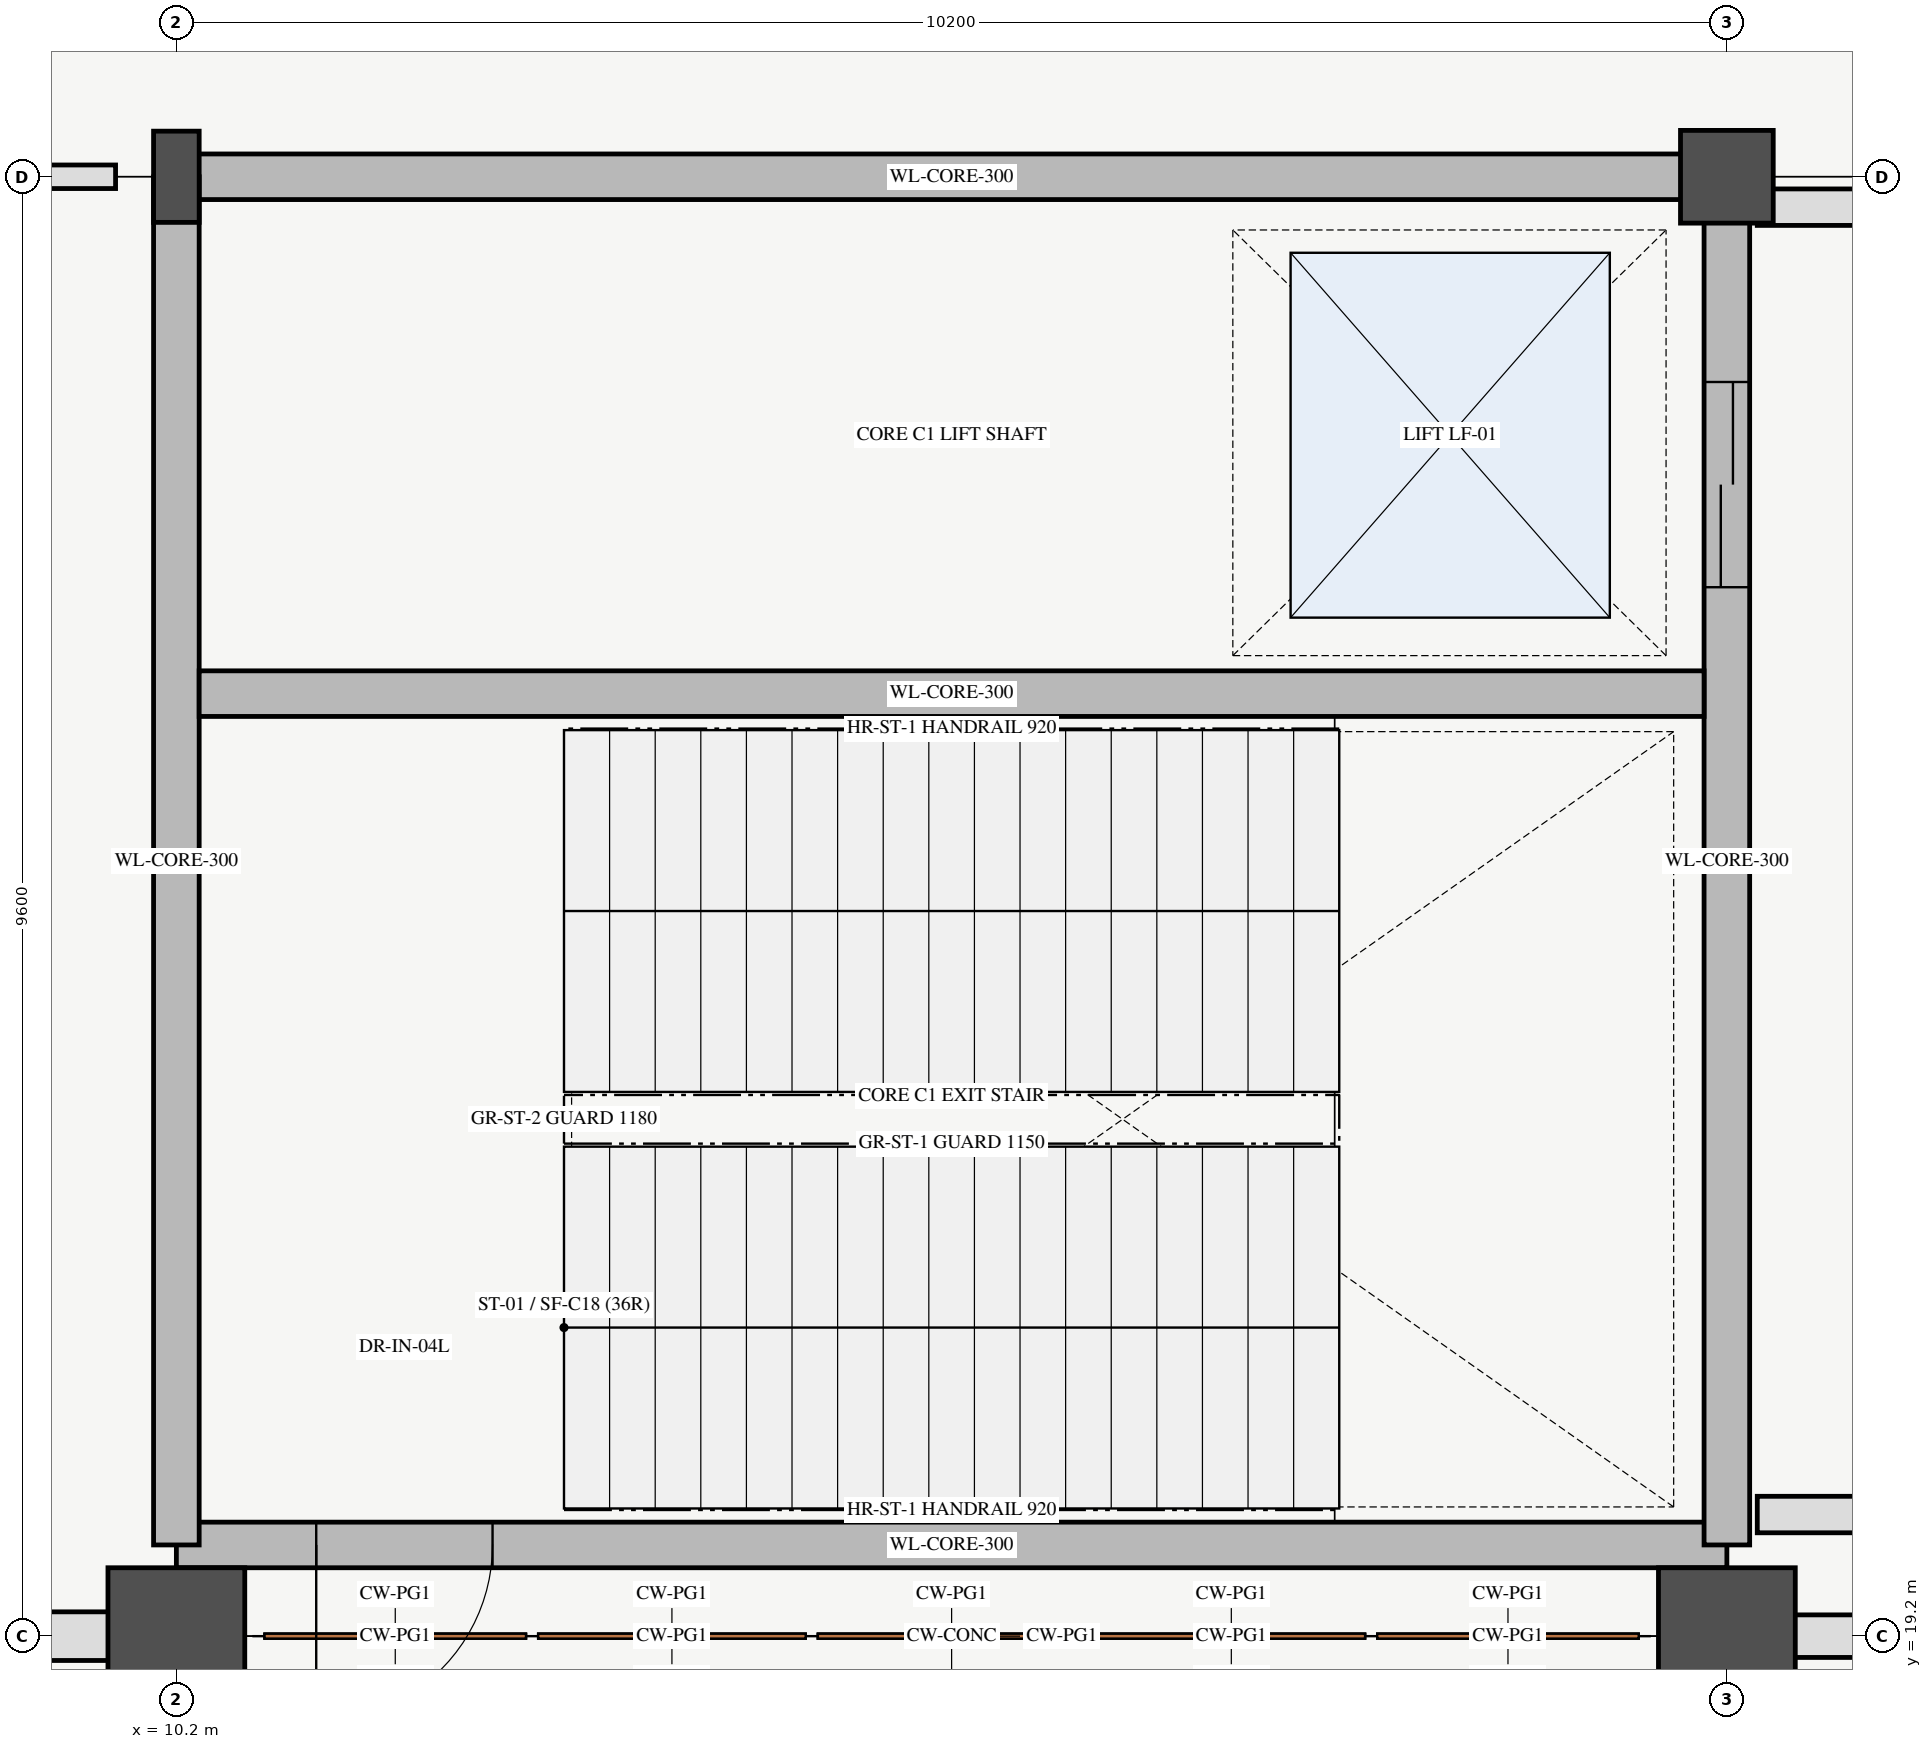
"""IFC4 building model, lengths in metres.
Left out: names, types, materials, properties, quantities, classifications, styles, units other than length and angle.
Written with IfcOpenShell. Run it as: python <this file> out.ifc"""

import sys

from ifc_helpers import new_model, si_unit, direction, frame, frame_2d, origin, origin_2d, place, context, subcontext, project, spatial, rectangle, hollow_circle, i_section, extrude, element, fill, save


model = new_model("IFC4")
c1 = context("Model", 3, precision=1e-05, world=origin(), true_north=direction((0.0, 1.0)))
c2 = subcontext(c1, "Body", "Model", "MODEL_VIEW")
j1 = project(units=[si_unit("LENGTHUNIT", "METRE"), si_unit("PLANEANGLEUNIT", "RADIAN")], contexts=[c1])
p1 = place(None, origin())
s1 = spatial("IfcSite", under=j1, at=p1, CompositionType="ELEMENT")
p2 = place(p1, origin())
s2 = spatial("IfcBuilding", under=s1, at=p2, CompositionType="ELEMENT")
p3 = place(p2, origin())
s3 = spatial("IfcBuildingStorey", under=s2, at=p3, CompositionType="ELEMENT", Elevation=0.0)
p4 = place(p3, frame((10.2, 19.2, 0.0), z_axis=(0.0, 0.0, 1.0), x_axis=(1.0, 0.0, 0.0)))
e1 = element("IfcColumn", 1, at=p4, inside=s3, PredefinedType="COLUMN", context=c2, shape_type="SweptSolid", body=[
    extrude(rectangle(XDim=0.9, YDim=0.9, at=origin_2d()), origin(), (0.0, 0.0, 1.0), 5.4),
])
p5 = place(p3, frame((10.2, 28.8, 0.0), z_axis=(0.0, 0.0, 1.0), x_axis=(1.0, 0.0, 0.0)))
e2 = element("IfcColumn", 2, at=p5, inside=s3, PredefinedType="COLUMN", context=c2, shape_type="SweptSolid", body=[
    extrude(i_section(OverallWidth=0.3, OverallDepth=0.6, WebThickness=0.015, FlangeThickness=0.03, FilletRadius=0.027, at=origin_2d()), origin(), (0.0, 0.0, 1.0), 5.4),
])
p6 = place(p3, frame((20.4, 19.2, 0.0), z_axis=(0.0, 0.0, 1.0), x_axis=(1.0, 0.0, 0.0)))
e3 = element("IfcColumn", 3, at=p6, inside=s3, PredefinedType="COLUMN", context=c2, shape_type="SweptSolid", body=[
    extrude(rectangle(XDim=0.9, YDim=0.9, at=origin_2d()), origin(), (0.0, 0.0, 1.0), 5.4),
])
p7 = place(p3, frame((20.4, 28.8, 0.0), z_axis=(0.0, 0.0, 1.0), x_axis=(1.0, 0.0, 0.0)))
e4 = element("IfcColumn", 4, at=p7, inside=s3, PredefinedType="COLUMN", context=c2, shape_type="SweptSolid", body=[
    extrude(hollow_circle(Radius=0.305, WallThickness=0.025, at=origin_2d()), origin(), (0.0, 0.0, 1.0), 5.4),
])
p8 = place(p3, frame((10.2, 19.8, 0.0), z_axis=(0.0, 0.0, 1.0), x_axis=(1.0, 0.0, 0.0)))
e5 = element("IfcWall", 5, at=p8, inside=s3, PredefinedType="SHEAR", context=c2, shape_type="SweptSolid", body=[
    extrude(rectangle(XDim=10.2, YDim=0.3, at=frame_2d((5.1, 0.0))), origin(), (0.0, 0.0, 1.0), 5.4),
])
p9 = place(p8, frame((0.92, 0.0, 0.0)))
e6 = element("IfcOpeningElement", 6, at=p9, cuts=e5, PredefinedType="OPENING", context=c2, shape_type="SweptSolid", body=[
    extrude(rectangle(XDim=1.16, YDim=2.2, at=frame_2d((0.58, 1.1))), frame((0.0, 0.16, 0.0), z_axis=(0.0, -1.0, 0.0), x_axis=(1.0, 0.0, 0.0)), (0.0, 0.0, 1.0), 0.32),
])
p10 = place(p3, frame((10.2, 28.8, 0.0), z_axis=(0.0, 0.0, 1.0), x_axis=(1.0, 0.0, 0.0)))
e7 = element("IfcWall", 7, at=p10, inside=s3, PredefinedType="SHEAR", context=c2, shape_type="SweptSolid", body=[
    extrude(rectangle(XDim=10.2, YDim=0.3, at=frame_2d((5.1, 0.0))), origin(), (0.0, 0.0, 1.0), 5.4),
])
p11 = place(p3, frame((10.2, 19.8, 0.0), z_axis=(0.0, 0.0, 1.0), x_axis=(0.0, 1.0, 0.0)))
e8 = element("IfcWall", 8, at=p11, inside=s3, PredefinedType="SHEAR", context=c2, shape_type="SweptSolid", body=[
    extrude(rectangle(XDim=9.0, YDim=0.3, at=frame_2d((4.5, 0.0))), origin(), (0.0, 0.0, 1.0), 5.4),
])
p12 = place(p3, frame((20.4, 19.8, 0.0), z_axis=(0.0, 0.0, 1.0), x_axis=(0.0, 1.0, 0.0)))
e9 = element("IfcWall", 9, at=p12, inside=s3, PredefinedType="SHEAR", context=c2, shape_type="SweptSolid", body=[
    extrude(rectangle(XDim=9.0, YDim=0.3, at=frame_2d((4.5, 0.0))), origin(), (0.0, 0.0, 1.0), 5.4),
])
p13 = place(p12, frame((6.3, 0.0, 0.0)))
e10 = element("IfcOpeningElement", 10, at=p13, cuts=e9, PredefinedType="OPENING", context=c2, shape_type="SweptSolid", body=[
    extrude(rectangle(XDim=1.35, YDim=2.3, at=frame_2d((0.675, 1.15))), frame((0.0, 0.16, 0.0), z_axis=(0.0, -1.0, 0.0), x_axis=(1.0, 0.0, 0.0)), (0.0, 0.0, 1.0), 0.32),
])
p14 = place(p3, frame((0.24, 19.2, 0.0), z_axis=(0.0, 0.0, 1.0), x_axis=(1.0, 0.0, 0.0)))
e11 = element("IfcWall", 11, at=p14, inside=s3, PredefinedType="SOLIDWALL", context=c2, shape_type="SweptSolid", body=[
    extrude(rectangle(XDim=9.72, YDim=0.32, at=frame_2d((4.86, 0.0))), origin(), (0.0, 0.0, 1.0), 3.68),
])
p15 = place(p14, frame((2.122, 0.0, 0.0)))
e12 = element("IfcOpeningElement", 12, at=p15, cuts=e11, PredefinedType="OPENING", context=c2, shape_type="SweptSolid", body=[
    extrude(rectangle(XDim=1.2, YDim=2.2, at=frame_2d((0.6, 1.1))), frame((0.0, 0.17, 0.0), z_axis=(0.0, -1.0, 0.0), x_axis=(1.0, 0.0, 0.0)), (0.0, 0.0, 1.0), 0.34),
])
p16 = place(p14, frame((4.81, 0.0, 0.9)))
e13 = element("IfcOpeningElement", 13, at=p16, cuts=e11, PredefinedType="OPENING", context=c2, shape_type="SweptSolid", body=[
    extrude(rectangle(XDim=3.6, YDim=2.1, at=frame_2d((1.8, 1.05))), frame((0.0, 0.17, 0.0), z_axis=(0.0, -1.0, 0.0), x_axis=(1.0, 0.0, 0.0)), (0.0, 0.0, 1.0), 0.34),
])
p17 = place(p3, frame((20.64, 19.2, 0.0), z_axis=(0.0, 0.0, 1.0), x_axis=(1.0, 0.0, 0.0)))
e14 = element("IfcWall", 14, at=p17, inside=s3, PredefinedType="STANDARD", context=c2, shape_type="SweptSolid", body=[
    extrude(rectangle(XDim=9.72, YDim=0.28, at=frame_2d((4.86, 0.0))), origin(), (0.0, 0.0, 1.0), 3.68),
])
p18 = place(p17, frame((1.027, 0.0, 0.0)))
e15 = element("IfcOpeningElement", 15, at=p18, cuts=e14, PredefinedType="OPENING", context=c2, shape_type="SweptSolid", body=[
    extrude(rectangle(XDim=3.0, YDim=2.5, at=frame_2d((1.5, 1.25))), frame((0.0, 0.15, 0.0), z_axis=(0.0, -1.0, 0.0), x_axis=(1.0, 0.0, 0.0)), (0.0, 0.0, 1.0), 0.3),
])
p19 = place(p17, frame((5.198, 0.0, 0.85)))
e16 = element("IfcOpeningElement", 16, at=p19, cuts=e14, PredefinedType="OPENING", context=c2, shape_type="SweptSolid", body=[
    extrude(rectangle(XDim=3.6, YDim=2.1, at=frame_2d((1.8, 1.05))), frame((0.0, 0.15, 0.0), z_axis=(0.0, -1.0, 0.0), x_axis=(1.0, 0.0, 0.0)), (0.0, 0.0, 1.0), 0.3),
])
p20 = place(p3, frame((10.35, 25.4, 0.0), z_axis=(0.0, 0.0, 1.0), x_axis=(1.0, 0.0, 0.0)))
e17 = element("IfcWall", 17, at=p20, inside=s3, PredefinedType="SHEAR", context=c2, shape_type="SweptSolid", body=[
    extrude(rectangle(XDim=9.9, YDim=0.3, at=frame_2d((4.95, 0.0))), origin(), (0.0, 0.0, 1.0), 5.4),
])
for number, where, z_axis, x_axis in (
    (18, (20.6, 28.6, 0.0), (0.0, 0.0, 1.0), (1.0, 0.0, 0.0)),
    (19, (20.6, 20.0, 0.0), (0.0, 0.0, 1.0), (1.0, 0.0, 0.0)),
):
    element("IfcWall", number, at=place(p3, frame(where, z_axis=z_axis, x_axis=x_axis)), inside=s3, PredefinedType="PARTITIONING", context=c2, shape_type="SweptSolid", body=[
        extrude(rectangle(XDim=5.0, YDim=0.24, at=frame_2d((2.5, 0.0))), origin(), (0.0, 0.0, 1.0), 4.08),
    ])
p21 = place(p3, frame((0.4, 28.8, 0.0), z_axis=(0.0, 0.0, 1.0), x_axis=(1.0, 0.0, 0.0)))
e20 = element("IfcWall", 20, at=p21, inside=s3, PredefinedType="PARTITIONING", context=c2, shape_type="SweptSolid", body=[
    extrude(rectangle(XDim=9.4, YDim=0.155, at=frame_2d((4.7, 0.0))), origin(), (0.0, 0.0, 1.0), 4.08),
])
p22 = place(p21, frame((4.2, 0.0, 0.0)))
e21 = element("IfcOpeningElement", 21, at=p22, cuts=e20, PredefinedType="OPENING", context=c2, shape_type="SweptSolid", body=[
    extrude(rectangle(XDim=1.0, YDim=2.15, at=frame_2d((0.5, 1.075))), frame((0.0, 0.087, 0.0), z_axis=(0.0, -1.0, 0.0), x_axis=(1.0, 0.0, 0.0)), (0.0, 0.0, 1.0), 0.175),
])
p23 = place(p9, frame((1.16, 0.0, 0.0), z_axis=(0.0, 0.0, 1.0), x_axis=(-1.0, 0.0, 0.0)))
e22 = element("IfcDoor", 22, at=p23, inside=s3, OperationType="SINGLE_SWING_LEFT", PredefinedType="DOOR", context=c2, shape_type="SweptSolid", body=[
    extrude(rectangle(XDim=1.16, YDim=2.2, at=frame_2d((0.58, 1.1))), frame((0.0, 0.025, 0.0), z_axis=(0.0, -1.0, 0.0), x_axis=(1.0, 0.0, 0.0)), (0.0, 0.0, 1.0), 0.05),
])
fill(e6, e22)
p24 = place(p13, origin())
e23 = element("IfcDoor", 23, at=p24, inside=s3, OperationType="DOUBLE_DOOR_SLIDING", PredefinedType="DOOR", context=c2, shape_type="SweptSolid", body=[
    extrude(rectangle(XDim=1.35, YDim=2.3, at=frame_2d((0.675, 1.15))), frame((0.0, 0.025, 0.0), z_axis=(0.0, -1.0, 0.0), x_axis=(1.0, 0.0, 0.0)), (0.0, 0.0, 1.0), 0.05),
])
fill(e10, e23)
save(model, sys.argv[1])
